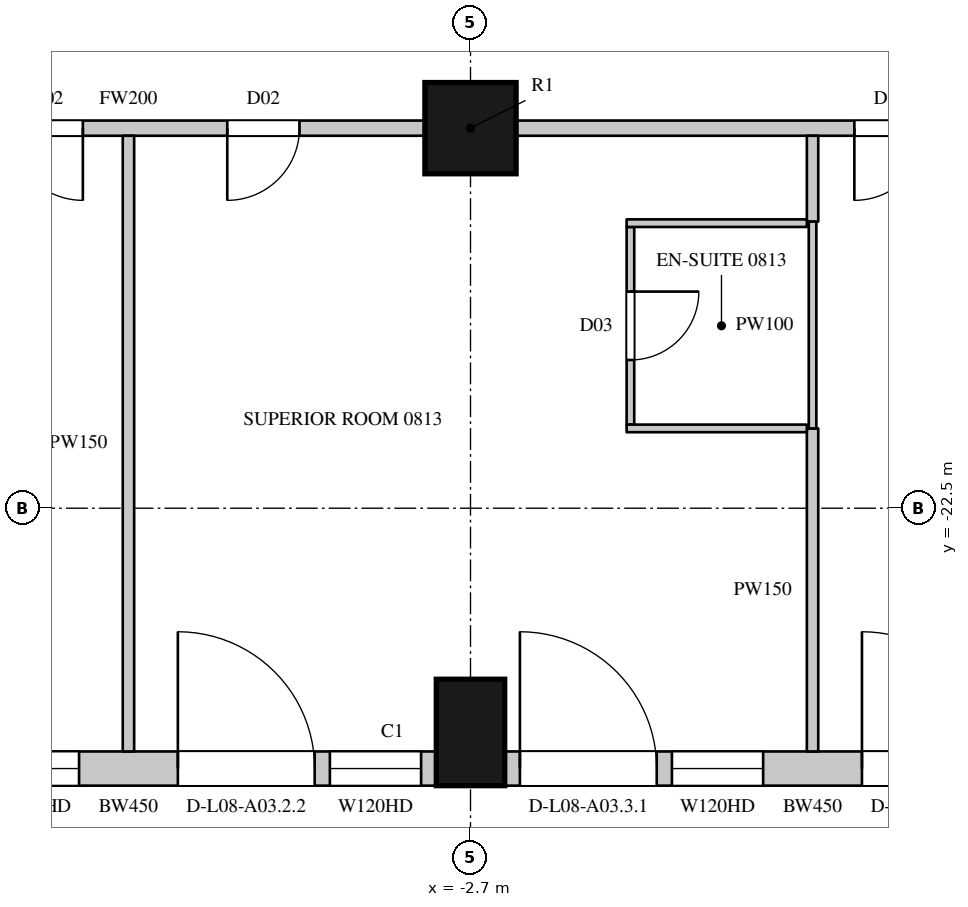
"""IFC4 building model, lengths in metres.
Left out: names, types, materials, properties, quantities, classifications, styles, units other than length and angle.
Written with IfcOpenShell. Run it as: python <this file> out.ifc"""

import sys

from ifc_helpers import new_model, si_unit, direction, frame, frame_2d, origin, origin_2d, place, context, subcontext, project, spatial, rectangle, circle, extrude, element, fill, save


model = new_model("IFC4")
c1 = context("Model", 3, precision=1e-05, world=origin(), true_north=direction((0.0, 1.0)))
c2 = subcontext(c1, "Body", "Model", "MODEL_VIEW")
j1 = project(units=[si_unit("LENGTHUNIT", "METRE"), si_unit("PLANEANGLEUNIT", "RADIAN")], contexts=[c1])
p1 = place(None, origin())
s1 = spatial("IfcSite", under=j1, at=p1, CompositionType="ELEMENT")
p2 = place(p1, origin())
s2 = spatial("IfcBuilding", under=s1, at=p2, CompositionType="ELEMENT")
p3 = place(p2, frame((0.0, 0.0, 59.1)))
s3 = spatial("IfcBuildingStorey", under=s2, at=p3, CompositionType="ELEMENT", Elevation=59.1)
p4 = place(p3, frame((-2.7, -25.45, 0.0), z_axis=(0.0, 0.0, 1.0), x_axis=(1.0, 0.0, 0.0)))
e1 = element("IfcColumn", 1, at=p4, inside=s3, PredefinedType="COLUMN", context=c2, shape_type="SweptSolid", body=[
    extrude(rectangle(XDim=0.9, YDim=1.4, at=origin_2d()), origin(), (0.0, 0.0, 1.0), 3.6),
])
p5 = place(p3, frame((-2.7, -17.5, 0.0), z_axis=(0.0, 0.0, 1.0), x_axis=(1.0, 0.0, 0.0)))
e2 = element("IfcColumn", 2, at=p5, inside=s3, PredefinedType="COLUMN", context=c2, shape_type="SweptSolid", body=[
    extrude(circle(Radius=0.6, at=origin_2d()), origin(), (0.0, 0.0, 1.0), 3.6),
])
p6 = place(p3, frame((-11.25, -25.925, 0.0), z_axis=(0.0, 0.0, 1.0), x_axis=(1.0, 0.0, 0.0)))
e3 = element("IfcWall", 3, at=p6, inside=s3, PredefinedType="SOLIDWALL", context=c2, shape_type="SweptSolid", body=[
    extrude(rectangle(XDim=8.1, YDim=0.45, at=frame_2d((4.05, 0.0))), origin(), (0.0, 0.0, 1.0), 3.3),
])
p7 = place(p6, frame((0.2, 0.0, 0.0)))
e4 = element("IfcOpeningElement", 4, at=p7, cuts=e3, PredefinedType="OPENING", context=c2, shape_type="SweptSolid", body=[
    extrude(rectangle(XDim=1.8, YDim=2.4, at=frame_2d((0.9, 1.2))), frame((0.0, 0.235, 0.0), z_axis=(0.0, -1.0, 0.0), x_axis=(1.0, 0.0, 0.0)), (0.0, 0.0, 1.0), 0.47),
])
p8 = place(p6, frame((2.2, 0.0, 1.05)))
e5 = element("IfcOpeningElement", 5, at=p8, cuts=e3, PredefinedType="OPENING", context=c2, shape_type="SweptSolid", body=[
    extrude(rectangle(XDim=1.2, YDim=2.0, at=frame_2d((0.6, 1.0))), frame((0.0, 0.235, 0.0), z_axis=(0.0, -1.0, 0.0), x_axis=(1.0, 0.0, 0.0)), (0.0, 0.0, 1.0), 0.47),
])
p9 = place(p6, frame((4.7, 0.0, 0.0)))
e6 = element("IfcOpeningElement", 6, at=p9, cuts=e3, PredefinedType="OPENING", context=c2, shape_type="SweptSolid", body=[
    extrude(rectangle(XDim=1.8, YDim=2.4, at=frame_2d((0.9, 1.2))), frame((0.0, 0.235, 0.0), z_axis=(0.0, -1.0, 0.0), x_axis=(1.0, 0.0, 0.0)), (0.0, 0.0, 1.0), 0.47),
])
p10 = place(p6, frame((6.7, 0.0, 1.05)))
e7 = element("IfcOpeningElement", 7, at=p10, cuts=e3, PredefinedType="OPENING", context=c2, shape_type="SweptSolid", body=[
    extrude(rectangle(XDim=1.2, YDim=2.0, at=frame_2d((0.6, 1.0))), frame((0.0, 0.235, 0.0), z_axis=(0.0, -1.0, 0.0), x_axis=(1.0, 0.0, 0.0)), (0.0, 0.0, 1.0), 0.47),
])
p11 = place(p3, frame((-2.25, -25.925, 0.0), z_axis=(0.0, 0.0, 1.0), x_axis=(1.0, 0.0, 0.0)))
e8 = element("IfcWall", 8, at=p11, inside=s3, PredefinedType="SOLIDWALL", context=c2, shape_type="SweptSolid", body=[
    extrude(rectangle(XDim=8.1, YDim=0.45, at=frame_2d((4.05, 0.0))), origin(), (0.0, 0.0, 1.0), 3.3),
])
p12 = place(p11, frame((0.2, 0.0, 0.0)))
e9 = element("IfcOpeningElement", 9, at=p12, cuts=e8, PredefinedType="OPENING", context=c2, shape_type="SweptSolid", body=[
    extrude(rectangle(XDim=1.8, YDim=2.4, at=frame_2d((0.9, 1.2))), frame((0.0, 0.235, 0.0), z_axis=(0.0, -1.0, 0.0), x_axis=(1.0, 0.0, 0.0)), (0.0, 0.0, 1.0), 0.47),
])
p13 = place(p11, frame((2.2, 0.0, 1.05)))
e10 = element("IfcOpeningElement", 10, at=p13, cuts=e8, PredefinedType="OPENING", context=c2, shape_type="SweptSolid", body=[
    extrude(rectangle(XDim=1.2, YDim=2.0, at=frame_2d((0.6, 1.0))), frame((0.0, 0.235, 0.0), z_axis=(0.0, -1.0, 0.0), x_axis=(1.0, 0.0, 0.0)), (0.0, 0.0, 1.0), 0.47),
])
p14 = place(p11, frame((4.7, 0.0, 0.0)))
e11 = element("IfcOpeningElement", 11, at=p14, cuts=e8, PredefinedType="OPENING", context=c2, shape_type="SweptSolid", body=[
    extrude(rectangle(XDim=1.8, YDim=2.4, at=frame_2d((0.9, 1.2))), frame((0.0, 0.235, 0.0), z_axis=(0.0, -1.0, 0.0), x_axis=(1.0, 0.0, 0.0)), (0.0, 0.0, 1.0), 0.47),
])
p15 = place(p11, frame((6.7, 0.0, 1.05)))
e12 = element("IfcOpeningElement", 12, at=p15, cuts=e8, PredefinedType="OPENING", context=c2, shape_type="SweptSolid", body=[
    extrude(rectangle(XDim=1.2, YDim=2.0, at=frame_2d((0.6, 1.0))), frame((0.0, 0.235, 0.0), z_axis=(0.0, -1.0, 0.0), x_axis=(1.0, 0.0, 0.0)), (0.0, 0.0, 1.0), 0.47),
])
p16 = place(p3, frame((-11.1, -17.5, 0.0), z_axis=(0.0, 0.0, 1.0), x_axis=(1.0, 0.0, 0.0)))
e13 = element("IfcWall", 13, at=p16, inside=s3, PredefinedType="PARTITIONING", context=c2, shape_type="SweptSolid", body=[
    extrude(rectangle(XDim=7.8, YDim=0.2, at=frame_2d((3.9, 0.0))), origin(), (0.0, 0.0, 1.0), 2.75),
])
p17 = place(p16, frame((2.35, 0.0, 0.0)))
e14 = element("IfcOpeningElement", 14, at=p17, cuts=e13, PredefinedType="OPENING", context=c2, shape_type="SweptSolid", body=[
    extrude(rectangle(XDim=0.95, YDim=2.2, at=frame_2d((0.475, 1.1))), frame((0.0, 0.11, 0.0), z_axis=(0.0, -1.0, 0.0), x_axis=(1.0, 0.0, 0.0)), (0.0, 0.0, 1.0), 0.22),
])
p18 = place(p16, frame((5.2, 0.0, 0.0)))
e15 = element("IfcOpeningElement", 15, at=p18, cuts=e13, PredefinedType="OPENING", context=c2, shape_type="SweptSolid", body=[
    extrude(rectangle(XDim=0.95, YDim=2.2, at=frame_2d((0.475, 1.1))), frame((0.0, 0.11, 0.0), z_axis=(0.0, -1.0, 0.0), x_axis=(1.0, 0.0, 0.0)), (0.0, 0.0, 1.0), 0.22),
])
p19 = place(p3, frame((-2.1, -17.5, 0.0), z_axis=(0.0, 0.0, 1.0), x_axis=(1.0, 0.0, 0.0)))
e16 = element("IfcWall", 16, at=p19, inside=s3, PredefinedType="PARTITIONING", context=c2, shape_type="SweptSolid", body=[
    extrude(rectangle(XDim=7.8, YDim=0.2, at=frame_2d((3.9, 0.0))), origin(), (0.0, 0.0, 1.0), 2.75),
])
p20 = place(p19, frame((4.45, 0.0, 0.0)))
e17 = element("IfcOpeningElement", 17, at=p20, cuts=e16, PredefinedType="OPENING", context=c2, shape_type="SweptSolid", body=[
    extrude(rectangle(XDim=0.95, YDim=2.2, at=frame_2d((0.475, 1.1))), frame((0.0, 0.11, 0.0), z_axis=(0.0, -1.0, 0.0), x_axis=(1.0, 0.0, 0.0)), (0.0, 0.0, 1.0), 0.22),
])
p21 = place(p3, frame((-7.2, -25.7, 0.0), z_axis=(0.0, 0.0, 1.0), x_axis=(0.0, 1.0, 0.0)))
e18 = element("IfcWall", 18, at=p21, inside=s3, PredefinedType="PARTITIONING", context=c2, shape_type="SweptSolid", body=[
    extrude(rectangle(XDim=8.1, YDim=0.15, at=frame_2d((4.05, 0.0))), origin(), (0.0, 0.0, 1.0), 2.65),
])
p22 = place(p3, frame((1.8, -25.7, 0.0), z_axis=(0.0, 0.0, 1.0), x_axis=(0.0, 1.0, 0.0)))
e19 = element("IfcWall", 19, at=p22, inside=s3, PredefinedType="PARTITIONING", context=c2, shape_type="SweptSolid", body=[
    extrude(rectangle(XDim=4.25, YDim=0.15, at=frame_2d((2.125, 0.0))), origin(), (0.0, 0.0, 1.0), 2.65),
])
p23 = place(p3, frame((1.8, -18.73, 0.0), z_axis=(0.0, 0.0, 1.0), x_axis=(0.0, 1.0, 0.0)))
e20 = element("IfcWall", 20, at=p23, inside=s3, PredefinedType="PARTITIONING", context=c2, shape_type="SweptSolid", body=[
    extrude(rectangle(XDim=1.13, YDim=0.15, at=frame_2d((0.565, 0.0))), origin(), (0.0, 0.0, 1.0), 2.65),
])
p24 = place(p3, frame((-0.596, -21.4, 0.0), z_axis=(0.0, 0.0, 1.0), x_axis=(0.0, 1.0, 0.0)))
e21 = element("IfcWall", 21, at=p24, inside=s3, PredefinedType="PARTITIONING", context=c2, shape_type="SweptSolid", body=[
    extrude(rectangle(XDim=2.6, YDim=0.1, at=frame_2d((1.3, 0.0))), origin(), (0.0, 0.0, 1.0), 3.3),
])
p25 = place(p24, frame((0.85, 0.0, 0.0)))
e22 = element("IfcOpeningElement", 22, at=p25, cuts=e21, PredefinedType="OPENING", context=c2, shape_type="SweptSolid", body=[
    extrude(rectangle(XDim=0.9, YDim=2.2, at=frame_2d((0.45, 1.1))), frame((0.0, 0.06, 0.0), z_axis=(0.0, -1.0, 0.0), x_axis=(1.0, 0.0, 0.0)), (0.0, 0.0, 1.0), 0.12),
])
for number, where, z_axis, x_axis in (
    (23, (-0.646, -21.45, 0.0), (0.0, 0.0, 1.0), (1.0, 0.0, 0.0)),
    (24, (-0.646, -18.75, 0.0), (0.0, 0.0, 1.0), (1.0, 0.0, 0.0)),
):
    element("IfcWall", number, at=place(p3, frame(where, z_axis=z_axis, x_axis=x_axis)), inside=s3, PredefinedType="PARTITIONING", context=c2, shape_type="SweptSolid", body=[
        extrude(rectangle(XDim=2.371, YDim=0.1, at=frame_2d((1.186, 0.0))), origin(), (0.0, 0.0, 1.0), 3.3),
    ])
p26 = place(p3, frame((1.8, -21.45, 0.0), z_axis=(0.0, 0.0, 1.0), x_axis=(0.0, 1.0, 0.0)))
e25 = element("IfcWall", 25, at=p26, inside=s3, PredefinedType="PARTITIONING", context=c2, shape_type="SweptSolid", body=[
    extrude(rectangle(XDim=2.72, YDim=0.1, at=frame_2d((1.36, 0.0))), origin(), (0.0, 0.0, 1.0), 2.65),
])
p27 = place(p8, origin())
e26 = element("IfcWindow", 26, at=p27, inside=s3, PartitioningType="SINGLE_PANEL", PredefinedType="WINDOW", context=c2, shape_type="SweptSolid", body=[
    extrude(rectangle(XDim=1.2, YDim=2.0, at=frame_2d((0.6, 1.0))), frame((0.0, 0.135, 0.0), z_axis=(0.0, -1.0, 0.0), x_axis=(1.0, 0.0, 0.0)), (0.0, 0.0, 1.0), 0.06),
])
fill(e5, e26)
p28 = place(p9, origin())
e27 = element("IfcDoor", 27, at=p28, inside=s3, OperationType="SLIDING_TO_LEFT", PredefinedType="DOOR", context=c2, shape_type="SweptSolid", body=[
    extrude(rectangle(XDim=1.8, YDim=2.4, at=frame_2d((0.9, 1.2))), frame((0.0, 0.13, 0.0), z_axis=(0.0, -1.0, 0.0), x_axis=(1.0, 0.0, 0.0)), (0.0, 0.0, 1.0), 0.05),
])
fill(e6, e27)
p29 = place(p10, origin())
e28 = element("IfcWindow", 28, at=p29, inside=s3, PartitioningType="SINGLE_PANEL", PredefinedType="WINDOW", context=c2, shape_type="SweptSolid", body=[
    extrude(rectangle(XDim=1.2, YDim=2.0, at=frame_2d((0.6, 1.0))), frame((0.0, 0.135, 0.0), z_axis=(0.0, -1.0, 0.0), x_axis=(1.0, 0.0, 0.0)), (0.0, 0.0, 1.0), 0.06),
])
fill(e7, e28)
p30 = place(p12, origin())
e29 = element("IfcDoor", 29, at=p30, inside=s3, OperationType="SLIDING_TO_LEFT", PredefinedType="DOOR", context=c2, shape_type="SweptSolid", body=[
    extrude(rectangle(XDim=1.8, YDim=2.4, at=frame_2d((0.9, 1.2))), frame((0.0, 0.13, 0.0), z_axis=(0.0, -1.0, 0.0), x_axis=(1.0, 0.0, 0.0)), (0.0, 0.0, 1.0), 0.05),
])
fill(e9, e29)
p31 = place(p13, origin())
e30 = element("IfcWindow", 30, at=p31, inside=s3, PartitioningType="SINGLE_PANEL", PredefinedType="WINDOW", context=c2, shape_type="SweptSolid", body=[
    extrude(rectangle(XDim=1.2, YDim=2.0, at=frame_2d((0.6, 1.0))), frame((0.0, 0.135, 0.0), z_axis=(0.0, -1.0, 0.0), x_axis=(1.0, 0.0, 0.0)), (0.0, 0.0, 1.0), 0.06),
])
fill(e10, e30)
p32 = place(p14, origin())
e31 = element("IfcDoor", 31, at=p32, inside=s3, OperationType="SLIDING_TO_LEFT", PredefinedType="DOOR", context=c2, shape_type="SweptSolid", body=[
    extrude(rectangle(XDim=1.8, YDim=2.4, at=frame_2d((0.9, 1.2))), frame((0.0, 0.13, 0.0), z_axis=(0.0, -1.0, 0.0), x_axis=(1.0, 0.0, 0.0)), (0.0, 0.0, 1.0), 0.05),
])
fill(e11, e31)
p33 = place(p17, origin())
e32 = element("IfcDoor", 32, at=p33, inside=s3, OperationType="SINGLE_SWING_LEFT", PredefinedType="DOOR", context=c2, shape_type="SweptSolid", body=[
    extrude(rectangle(XDim=0.95, YDim=2.2, at=frame_2d((0.475, 1.1))), frame((0.0, 0.025, 0.0), z_axis=(0.0, -1.0, 0.0), x_axis=(1.0, 0.0, 0.0)), (0.0, 0.0, 1.0), 0.05),
])
fill(e14, e32)
p34 = place(p18, origin())
e33 = element("IfcDoor", 33, at=p34, inside=s3, OperationType="SINGLE_SWING_RIGHT", PredefinedType="DOOR", context=c2, shape_type="SweptSolid", body=[
    extrude(rectangle(XDim=0.95, YDim=2.2, at=frame_2d((0.475, 1.1))), frame((0.0, 0.025, 0.0), z_axis=(0.0, -1.0, 0.0), x_axis=(1.0, 0.0, 0.0)), (0.0, 0.0, 1.0), 0.05),
])
fill(e15, e33)
p35 = place(p25, origin())
e34 = element("IfcDoor", 34, at=p35, inside=s3, OperationType="SINGLE_SWING_LEFT", PredefinedType="DOOR", context=c2, shape_type="SweptSolid", body=[
    extrude(rectangle(XDim=0.9, YDim=2.2, at=frame_2d((0.45, 1.1))), frame((0.0, 0.025, 0.0), z_axis=(0.0, -1.0, 0.0), x_axis=(1.0, 0.0, 0.0)), (0.0, 0.0, 1.0), 0.05),
])
fill(e22, e34)
p36 = place(p20, origin())
e35 = element("IfcDoor", 35, at=p36, inside=s3, OperationType="SINGLE_SWING_RIGHT", PredefinedType="DOOR", context=c2, shape_type="SweptSolid", body=[
    extrude(rectangle(XDim=0.95, YDim=2.2, at=frame_2d((0.475, 1.1))), frame((0.0, 0.025, 0.0), z_axis=(0.0, -1.0, 0.0), x_axis=(1.0, 0.0, 0.0)), (0.0, 0.0, 1.0), 0.05),
])
fill(e17, e35)
save(model, sys.argv[1])
